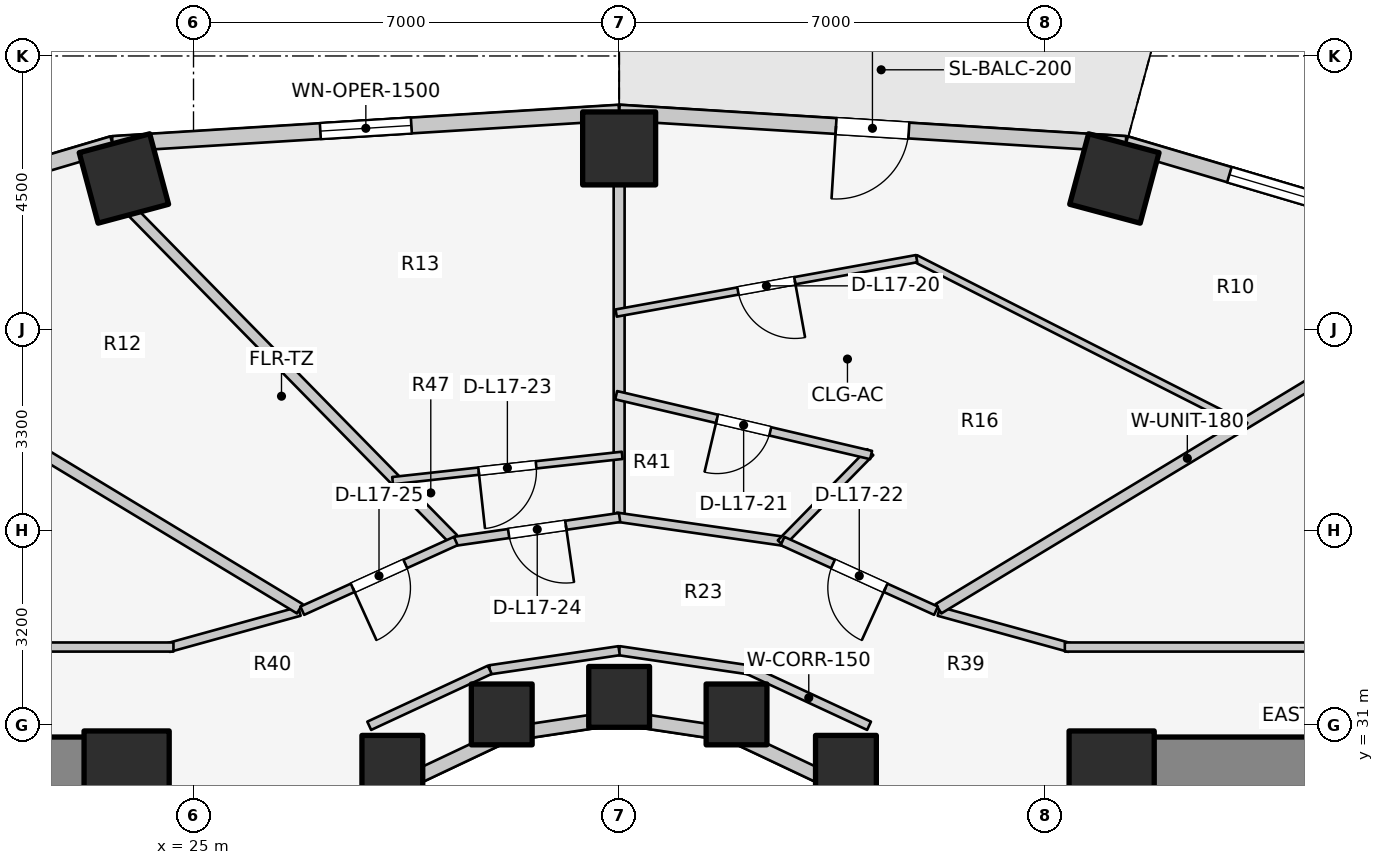
"""IFC4 building model, lengths in metres.
Left out: names, types, materials, properties, quantities, classifications, styles, units other than length and angle.
Written with IfcOpenShell. Run it as: python <this file> out.ifc"""

import sys

from ifc_helpers import new_model, si_unit, direction, frame, frame_2d, origin, origin_2d, place, context, subcontext, project, spatial, rectangle, extrude, element, fill, save


model = new_model("IFC4")
c1 = context("Model", 3, precision=1e-05, world=origin(), true_north=direction((0.0, 1.0)))
c2 = subcontext(c1, "Body", "Model", "MODEL_VIEW")
j1 = project(units=[si_unit("LENGTHUNIT", "METRE"), si_unit("PLANEANGLEUNIT", "RADIAN")], contexts=[c1])
p1 = place(None, origin())
s1 = spatial("IfcSite", under=j1, at=p1, CompositionType="ELEMENT")
p2 = place(p1, origin())
s2 = spatial("IfcBuilding", under=s1, at=p2, CompositionType="ELEMENT")
p3 = place(p2, frame((0.0, 0.0, 58.6)))
s3 = spatial("IfcBuildingStorey", under=s2, at=p3, CompositionType="ELEMENT", Elevation=58.6)
for number, where, z_axis, x_axis in (
    (1, (19.65, 30.35, 0.0), (0.0, 0.0, 1.0), (1.0, 0.0, 0.0)),
    (2, (39.85, 30.35, 0.0), (0.0, 0.0, 1.0), (1.0, 0.0, 0.0)),
):
    element("IfcWall", number, at=place(p3, frame(where, z_axis=z_axis, x_axis=x_axis)), inside=s3, PredefinedType="SHEAR", context=c2, shape_type="SweptSolid", body=[
        extrude(rectangle(XDim=4.5, YDim=0.9, at=frame_2d((2.25, 0.0))), origin(), (0.0, 0.0, 1.0), 3.1),
    ])
for number, where, z_axis, x_axis in (
    (3, (23.9, 30.2, 0.0), (0.0, 0.0, 1.0), (1.0, 0.0, 0.0)),
    (4, (40.1, 30.2, 0.0), (0.0, 0.0, 1.0), (1.0, 0.0, 0.0)),
):
    element("IfcColumn", number, at=place(p3, frame(where, z_axis=z_axis, x_axis=x_axis)), inside=s3, PredefinedType="COLUMN", context=c2, shape_type="SweptSolid", body=[
        extrude(rectangle(XDim=1.4, YDim=1.4, at=origin_2d()), origin(), (0.0, 0.0, 1.0), 3.1),
    ])
for number, where, z_axis, x_axis in (
    (5, (35.73, 30.327, 0.0), (0.0, 0.0, 1.0), (1.0, 0.0, 0.0)),
    (6, (33.931, 31.172, 0.0), (0.0, 0.0, 1.0), (1.0, 0.0, 0.0)),
):
    element("IfcColumn", number, at=place(p3, frame(where, z_axis=z_axis, x_axis=x_axis)), inside=s3, PredefinedType="COLUMN", context=c2, shape_type="SweptSolid", body=[
        extrude(rectangle(XDim=1.0, YDim=1.0, at=origin_2d()), origin(), (0.0, 0.0, 1.0), 3.1),
    ])
p4 = place(p3, frame((40.145, 39.986, 0.0), z_axis=(0.0, 0.0, 1.0), x_axis=(0.258819045103, 0.965925826289, 0.0)))
e7 = element("IfcColumn", 7, at=p4, inside=s3, PredefinedType="COLUMN", context=c2, shape_type="SweptSolid", body=[
    extrude(rectangle(XDim=1.2, YDim=1.2, at=origin_2d()), origin(), (0.0, 0.0, 1.0), 3.1),
])
p5 = place(p3, frame((32.0, 31.46, 0.0), z_axis=(0.0, 0.0, 1.0), x_axis=(1.0, 0.0, 0.0)))
e8 = element("IfcColumn", 8, at=p5, inside=s3, PredefinedType="COLUMN", context=c2, shape_type="SweptSolid", body=[
    extrude(rectangle(XDim=1.0, YDim=1.0, at=origin_2d()), origin(), (0.0, 0.0, 1.0), 3.1),
])
p6 = place(p3, frame((32.0, 40.48, 0.0), z_axis=(0.0, 0.0, 1.0), x_axis=(0.0, 1.0, 0.0)))
e9 = element("IfcColumn", 9, at=p6, inside=s3, PredefinedType="COLUMN", context=c2, shape_type="SweptSolid", body=[
    extrude(rectangle(XDim=1.2, YDim=1.2, at=origin_2d()), origin(), (0.0, 0.0, 1.0), 3.1),
])
p7 = place(p3, frame((30.069, 31.172, 0.0), z_axis=(0.0, 0.0, 1.0), x_axis=(1.0, 0.0, 0.0)))
e10 = element("IfcColumn", 10, at=p7, inside=s3, PredefinedType="COLUMN", context=c2, shape_type="SweptSolid", body=[
    extrude(rectangle(XDim=1.0, YDim=1.0, at=origin_2d()), origin(), (0.0, 0.0, 1.0), 3.1),
])
p8 = place(p3, frame((23.855, 39.986, 0.0), z_axis=(0.0, 0.0, 1.0), x_axis=(-0.258819045103, 0.965925826289, 0.0)))
e11 = element("IfcColumn", 11, at=p8, inside=s3, PredefinedType="COLUMN", context=c2, shape_type="SweptSolid", body=[
    extrude(rectangle(XDim=1.2, YDim=1.2, at=origin_2d()), origin(), (0.0, 0.0, 1.0), 3.1),
])
p9 = place(p3, frame((28.27, 30.327, 0.0), z_axis=(0.0, 0.0, 1.0), x_axis=(1.0, 0.0, 0.0)))
e12 = element("IfcColumn", 12, at=p9, inside=s3, PredefinedType="COLUMN", context=c2, shape_type="SweptSolid", body=[
    extrude(rectangle(XDim=1.0, YDim=1.0, at=origin_2d()), origin(), (0.0, 0.0, 1.0), 3.1),
])
p10 = place(p3, frame((37.035, 28.742, 0.0), z_axis=(0.0, 0.0, 1.0), x_axis=(-0.752576694707, 0.658504607869, 0.0)))
e13 = element("IfcWall", 13, at=p10, inside=s3, PredefinedType="STANDARD", context=c2, shape_type="SweptSolid", body=[
    extrude(rectangle(XDim=1.959, YDim=0.23, at=frame_2d((0.98, 0.0))), origin(), (0.0, 0.0, 1.0), 2.16),
])
p11 = place(p3, frame((35.56, 30.032, 0.0), z_axis=(0.0, 0.0, 1.0), x_axis=(-0.904179699603, 0.427152280606, 0.0)))
e14 = element("IfcWall", 14, at=p11, inside=s3, PredefinedType="STANDARD", context=c2, shape_type="SweptSolid", body=[
    extrude(rectangle(XDim=1.899, YDim=0.23, at=frame_2d((0.95, 0.0))), origin(), (0.0, 0.0, 1.0), 2.16),
])
for number, where, z_axis, x_axis in (
    (15, (33.843, 30.843, 0.0), (0.0, 0.0, 1.0), (-0.989, 0.149, 0.0)),
    (16, (32.0, 31.12, 0.0), (0.0, 0.0, 1.0), (-0.989, -0.149, 0.0)),
):
    element("IfcWall", number, at=place(p3, frame(where, z_axis=z_axis, x_axis=x_axis)), inside=s3, PredefinedType="STANDARD", context=c2, shape_type="SweptSolid", body=[
        extrude(rectangle(XDim=1.864, YDim=0.23, at=frame_2d((0.932, 0.0))), origin(), (0.0, 0.0, 1.0), 2.16),
    ])
p12 = place(p3, frame((30.157, 30.843, 0.0), z_axis=(0.0, 0.0, 1.0), x_axis=(-0.904179699603, -0.427152280606, 0.0)))
e17 = element("IfcWall", 17, at=p12, inside=s3, PredefinedType="STANDARD", context=c2, shape_type="SweptSolid", body=[
    extrude(rectangle(XDim=1.899, YDim=0.23, at=frame_2d((0.95, 0.0))), origin(), (0.0, 0.0, 1.0), 2.16),
])
p13 = place(p3, frame((28.44, 30.032, 0.0), z_axis=(0.0, 0.0, 1.0), x_axis=(-0.752576694707, -0.658504607869, 0.0)))
e18 = element("IfcWall", 18, at=p13, inside=s3, PredefinedType="STANDARD", context=c2, shape_type="SweptSolid", body=[
    extrude(rectangle(XDim=1.959, YDim=0.23, at=frame_2d((0.98, 0.0))), origin(), (0.0, 0.0, 1.0), 2.16),
])
p14 = place(p3, frame((46.042, 38.862, 0.0), z_axis=(0.0, 0.0, 1.0), x_axis=(-0.958843593522, 0.283934786811, 0.0)))
e19 = element("IfcWall", 19, at=p14, inside=s3, PredefinedType="STANDARD", context=c2, shape_type="SweptSolid", body=[
    extrude(rectangle(XDim=5.955, YDim=0.26, at=frame_2d((2.978, 0.0))), origin(), (0.0, 0.0, 1.0), 2.85),
])
p15 = place(p14, frame((1.778, 0.0, 0.75)))
e20 = element("IfcOpeningElement", 20, at=p15, cuts=e19, PredefinedType="OPENING", context=c2, shape_type="SweptSolid", body=[
    extrude(rectangle(XDim=2.4, YDim=1.7, at=frame_2d((1.2, 0.85))), frame((0.0, 0.14, 0.0), z_axis=(0.0, -1.0, 0.0), x_axis=(1.0, 0.0, 0.0)), (0.0, 0.0, 1.0), 0.28),
])
p16 = place(p3, frame((40.332, 40.553, 0.0), z_axis=(0.0, 0.0, 1.0), x_axis=(-0.998090514779, 0.061768311519, 0.0)))
e21 = element("IfcWall", 21, at=p16, inside=s3, PredefinedType="STANDARD", context=c2, shape_type="SweptSolid", body=[
    extrude(rectangle(XDim=8.348, YDim=0.26, at=frame_2d((4.174, 0.0))), origin(), (0.0, 0.0, 1.0), 2.88),
])
p17 = place(p16, frame((3.574, 0.0, 0.0)))
e22 = element("IfcOpeningElement", 22, at=p17, cuts=e21, PredefinedType="OPENING", context=c2, shape_type="SweptSolid", body=[
    extrude(rectangle(XDim=1.2, YDim=2.2, at=frame_2d((0.6, 1.1))), frame((0.0, 0.14, 0.0), z_axis=(0.0, -1.0, 0.0), x_axis=(1.0, 0.0, 0.0)), (0.0, 0.0, 1.0), 0.28),
])
p18 = place(p3, frame((32.0, 41.069, 0.0), z_axis=(0.0, 0.0, 1.0), x_axis=(-0.998090514779, -0.061768311519, 0.0)))
e23 = element("IfcWall", 23, at=p18, inside=s3, PredefinedType="STANDARD", context=c2, shape_type="SweptSolid", body=[
    extrude(rectangle(XDim=8.348, YDim=0.26, at=frame_2d((4.174, 0.0))), origin(), (0.0, 0.0, 1.0), 2.85),
])
p19 = place(p18, frame((3.424, 0.0, 0.75)))
e24 = element("IfcOpeningElement", 24, at=p19, cuts=e23, PredefinedType="OPENING", context=c2, shape_type="SweptSolid", body=[
    extrude(rectangle(XDim=1.5, YDim=1.6, at=frame_2d((0.75, 0.8))), frame((0.0, 0.14, 0.0), z_axis=(0.0, -1.0, 0.0), x_axis=(1.0, 0.0, 0.0)), (0.0, 0.0, 1.0), 0.28),
])
p20 = place(p3, frame((23.668, 40.553, 0.0), z_axis=(0.0, 0.0, 1.0), x_axis=(-0.958843593522, -0.283934786811, 0.0)))
e25 = element("IfcWall", 25, at=p20, inside=s3, PredefinedType="STANDARD", context=c2, shape_type="SweptSolid", body=[
    extrude(rectangle(XDim=5.955, YDim=0.26, at=frame_2d((2.978, 0.0))), origin(), (0.0, 0.0, 1.0), 2.85),
])
p21 = place(p20, frame((1.778, 0.0, 0.75)))
e26 = element("IfcOpeningElement", 26, at=p21, cuts=e25, PredefinedType="OPENING", context=c2, shape_type="SweptSolid", body=[
    extrude(rectangle(XDim=2.4, YDim=1.7, at=frame_2d((1.2, 0.85))), frame((0.0, 0.14, 0.0), z_axis=(0.0, -1.0, 0.0), x_axis=(1.0, 0.0, 0.0)), (0.0, 0.0, 1.0), 0.28),
])
p22 = place(p3, frame((36.11, 30.985, 0.0), z_axis=(0.0, 0.0, 1.0), x_axis=(-0.906943449489, 0.421252393975, 0.0)))
e27 = element("IfcWall", 27, at=p22, inside=s3, PredefinedType="PARTITIONING", context=c2, shape_type="SweptSolid", body=[
    extrude(rectangle(XDim=2.186, YDim=0.15, at=frame_2d((1.093, 0.0))), origin(), (0.0, 0.0, 1.0), 2.237),
])
for number, where, z_axis, x_axis in (
    (28, (34.127, 31.906, 0.0), (0.0, 0.0, 1.0), (-0.989, 0.146, 0.0)),
    (29, (32.0, 32.22, 0.0), (0.0, 0.0, 1.0), (-0.989, -0.146, 0.0)),
):
    element("IfcWall", number, at=place(p3, frame(where, z_axis=z_axis, x_axis=x_axis)), inside=s3, PredefinedType="PARTITIONING", context=c2, shape_type="SweptSolid", body=[
        extrude(rectangle(XDim=2.151, YDim=0.15, at=frame_2d((1.075, 0.0))), origin(), (0.0, 0.0, 1.0), 2.237),
    ])
p23 = place(p3, frame((29.873, 31.906, 0.0), z_axis=(0.0, 0.0, 1.0), x_axis=(-0.906943449489, -0.421252393975, 0.0)))
e30 = element("IfcWall", 30, at=p23, inside=s3, PredefinedType="PARTITIONING", context=c2, shape_type="SweptSolid", body=[
    extrude(rectangle(XDim=2.186, YDim=0.15, at=frame_2d((1.093, 0.0))), origin(), (0.0, 0.0, 1.0), 2.237),
])
p24 = place(p3, frame((37.258, 32.867, 0.0), z_axis=(0.0, 0.0, 1.0), x_axis=(0.963833843713, -0.266503886865, 0.0)))
e31 = element("IfcWall", 31, at=p24, inside=s3, PredefinedType="PARTITIONING", context=c2, shape_type="SweptSolid", body=[
    extrude(rectangle(XDim=2.232, YDim=0.15, at=frame_2d((1.116, 0.0))), origin(), (0.0, 0.0, 1.0), 2.237),
])
p25 = place(p3, frame((39.33, 32.28, 0.0), z_axis=(0.0, 0.0, 1.0), x_axis=(1.0, 0.0, 0.0)))
e32 = element("IfcWall", 32, at=p25, inside=s3, PredefinedType="PARTITIONING", context=c2, shape_type="SweptSolid", body=[
    extrude(rectangle(XDim=7.52, YDim=0.15, at=frame_2d((3.76, 0.0))), origin(), (0.0, 0.0, 1.0), 2.237),
])
p26 = place(p25, frame((5.22, 0.0, 0.0)))
e33 = element("IfcOpeningElement", 33, at=p26, cuts=e32, PredefinedType="OPENING", context=c2, shape_type="SweptSolid", body=[
    extrude(rectangle(XDim=0.9, YDim=2.1, at=frame_2d((0.45, 1.05))), frame((0.0, 0.085, 0.0), z_axis=(0.0, -1.0, 0.0), x_axis=(1.0, 0.0, 0.0)), (0.0, 0.0, 1.0), 0.17),
])
p27 = place(p3, frame((26.742, 32.867, 0.0), z_axis=(0.0, 0.0, 1.0), x_axis=(-0.963833843713, -0.266503886865, 0.0)))
e34 = element("IfcWall", 34, at=p27, inside=s3, PredefinedType="PARTITIONING", context=c2, shape_type="SweptSolid", body=[
    extrude(rectangle(XDim=2.232, YDim=0.15, at=frame_2d((1.116, 0.0))), origin(), (0.0, 0.0, 1.0), 2.237),
])
p28 = place(p3, frame((17.15, 32.28, 0.0), z_axis=(0.0, 0.0, 1.0), x_axis=(1.0, 0.0, 0.0)))
e35 = element("IfcWall", 35, at=p28, inside=s3, PredefinedType="PARTITIONING", context=c2, shape_type="SweptSolid", body=[
    extrude(rectangle(XDim=7.52, YDim=0.15, at=frame_2d((3.76, 0.0))), origin(), (0.0, 0.0, 1.0), 2.237),
])
p29 = place(p28, frame((1.3, 0.0, 0.0)))
e36 = element("IfcOpeningElement", 36, at=p29, cuts=e35, PredefinedType="OPENING", context=c2, shape_type="SweptSolid", body=[
    extrude(rectangle(XDim=0.9, YDim=2.1, at=frame_2d((0.45, 1.05))), frame((0.0, 0.085, 0.0), z_axis=(0.0, -1.0, 0.0), x_axis=(1.0, 0.0, 0.0)), (0.0, 0.0, 1.0), 0.17),
])
p30 = place(p3, frame((37.252, 32.91, 0.0), z_axis=(0.0, 0.0, 1.0), x_axis=(0.855817136021, 0.517278483694, 0.0)))
e37 = element("IfcWall", 37, at=p30, inside=s3, PredefinedType="PARTITIONING", context=c2, shape_type="SweptSolid", body=[
    extrude(rectangle(XDim=9.564, YDim=0.18, at=frame_2d((4.782, 0.0))), origin(), (0.0, 0.0, 1.0), 2.237),
])
p31 = place(p3, frame((32.0, 34.465, 0.0), z_axis=(0.0, 0.0, 1.0), x_axis=(0.0, 1.0, 0.0)))
e38 = element("IfcWall", 38, at=p31, inside=s3, PredefinedType="PARTITIONING", context=c2, shape_type="SweptSolid", body=[
    extrude(rectangle(XDim=5.435, YDim=0.18, at=frame_2d((2.717, 0.0))), origin(), (0.0, 0.0, 1.0), 2.237),
])
p32 = place(p3, frame((29.267, 34.061, 0.0), z_axis=(0.0, 0.0, 1.0), x_axis=(-0.700234780085, 0.713912636644, 0.0)))
e39 = element("IfcWall", 39, at=p32, inside=s3, PredefinedType="PARTITIONING", context=c2, shape_type="SweptSolid", body=[
    extrude(rectangle(XDim=7.515, YDim=0.18, at=frame_2d((3.757, 0.0))), origin(), (0.0, 0.0, 1.0), 2.237),
])
p33 = place(p3, frame((26.748, 32.91, 0.0), z_axis=(0.0, 0.0, 1.0), x_axis=(-0.855817136021, 0.517278483694, 0.0)))
e40 = element("IfcWall", 40, at=p33, inside=s3, PredefinedType="PARTITIONING", context=c2, shape_type="SweptSolid", body=[
    extrude(rectangle(XDim=9.564, YDim=0.18, at=frame_2d((4.782, 0.0))), origin(), (0.0, 0.0, 1.0), 2.237),
])
p34 = place(p3, frame((42.305, 35.914, 0.0), z_axis=(0.0, 0.0, 1.0), x_axis=(-0.891749407737, 0.452529550195, 0.0)))
e41 = element("IfcWall", 41, at=p34, inside=s3, PredefinedType="MOVABLE", context=c2, shape_type="SweptSolid", body=[
    extrude(rectangle(XDim=6.09, YDim=0.12, at=frame_2d((3.045, 0.0))), origin(), (0.0, 0.0, 1.0), 2.237),
])
p35 = place(p3, frame((36.893, 38.667, 0.0), z_axis=(0.0, 0.0, 1.0), x_axis=(-0.983992567634, -0.178209502665, 0.0)))
e42 = element("IfcWall", 42, at=p35, inside=s3, PredefinedType="MOVABLE", context=c2, shape_type="SweptSolid", body=[
    extrude(rectangle(XDim=5.022, YDim=0.12, at=frame_2d((2.511, 0.0))), origin(), (0.0, 0.0, 1.0), 2.237),
])
p36 = place(p35, frame((2.036, 0.0, 0.0)))
e43 = element("IfcOpeningElement", 43, at=p36, cuts=e42, PredefinedType="OPENING", context=c2, shape_type="SweptSolid", body=[
    extrude(rectangle(XDim=0.95, YDim=2.1, at=frame_2d((0.475, 1.05))), frame((0.0, 0.07, 0.0), z_axis=(0.0, -1.0, 0.0), x_axis=(1.0, 0.0, 0.0)), (0.0, 0.0, 1.0), 0.14),
])
p37 = place(p3, frame((34.744, 34.014, 0.0), z_axis=(0.0, 0.0, 1.0), x_axis=(-0.989761784218, 0.142729150844, 0.0)))
e44 = element("IfcWall", 44, at=p37, inside=s3, PredefinedType="PARTITIONING", context=c2, shape_type="SweptSolid", body=[
    extrude(rectangle(XDim=2.822, YDim=0.15, at=frame_2d((1.411, 0.0))), origin(), (0.0, 0.0, 1.0), 2.237),
])
p38 = place(p3, frame((34.659, 33.986, 0.0), z_axis=(0.0, 0.0, 1.0), x_axis=(0.700331728855, 0.713817532398, 0.0)))
e45 = element("IfcWall", 45, at=p38, inside=s3, PredefinedType="PLUMBINGWALL", context=c2, shape_type="SweptSolid", body=[
    extrude(rectangle(XDim=2.1, YDim=0.14, at=frame_2d((1.05, 0.0))), origin(), (0.0, 0.0, 1.0), 2.385),
])
p39 = place(p3, frame((36.144, 35.438, 0.0), z_axis=(0.0, 0.0, 1.0), x_axis=(-0.973546394015, 0.228489427982, 0.0)))
e46 = element("IfcWall", 46, at=p39, inside=s3, PredefinedType="PLUMBINGWALL", context=c2, shape_type="SweptSolid", body=[
    extrude(rectangle(XDim=4.306, YDim=0.14, at=frame_2d((2.153, 0.0))), origin(), (0.0, 0.0, 1.0), 2.237),
])
p40 = place(p39, frame((1.703, 0.0, 0.0)))
e47 = element("IfcOpeningElement", 47, at=p40, cuts=e46, PredefinedType="OPENING", context=c2, shape_type="SweptSolid", body=[
    extrude(rectangle(XDim=0.9, YDim=2.1, at=frame_2d((0.45, 1.05))), frame((0.0, 0.08, 0.0), z_axis=(0.0, -1.0, 0.0), x_axis=(1.0, 0.0, 0.0)), (0.0, 0.0, 1.0), 0.16),
])
p41 = place(p3, frame((37.211, 32.877, 0.0), z_axis=(0.0, 0.0, 1.0), x_axis=(-0.910568469686, 0.41335827319, 0.0)))
e48 = element("IfcWall", 48, at=p41, inside=s3, PredefinedType="PARTITIONING", context=c2, shape_type="SweptSolid", body=[
    extrude(rectangle(XDim=2.772, YDim=0.15, at=frame_2d((1.386, 0.0))), origin(), (0.0, 0.0, 1.0), 2.237),
])
p42 = place(p41, frame((0.911, 0.0, 0.0)))
e49 = element("IfcOpeningElement", 49, at=p42, cuts=e48, PredefinedType="OPENING", context=c2, shape_type="SweptSolid", body=[
    extrude(rectangle(XDim=0.95, YDim=2.1, at=frame_2d((0.475, 1.05))), frame((0.0, 0.085, 0.0), z_axis=(0.0, -1.0, 0.0), x_axis=(1.0, 0.0, 0.0)), (0.0, 0.0, 1.0), 0.17),
])
p43 = place(p3, frame((32.05, 35.432, 0.0), z_axis=(0.0, 0.0, 1.0), x_axis=(-0.993997647441, -0.109401448263, 0.0)))
e50 = element("IfcWall", 50, at=p43, inside=s3, PredefinedType="MOVABLE", context=c2, shape_type="SweptSolid", body=[
    extrude(rectangle(XDim=3.798, YDim=0.12, at=frame_2d((1.899, 0.0))), origin(), (0.0, 0.0, 1.0), 2.237),
])
p44 = place(p43, frame((1.424, 0.0, 0.0)))
e51 = element("IfcOpeningElement", 51, at=p44, cuts=e50, PredefinedType="OPENING", context=c2, shape_type="SweptSolid", body=[
    extrude(rectangle(XDim=0.95, YDim=2.1, at=frame_2d((0.475, 1.05))), frame((0.0, 0.07, 0.0), z_axis=(0.0, -1.0, 0.0), x_axis=(1.0, 0.0, 0.0)), (0.0, 0.0, 1.0), 0.14),
])
p45 = place(p3, frame((32.007, 34.41, 0.0), z_axis=(0.0, 0.0, 1.0), x_axis=(-0.989748682384, -0.142819976611, 0.0)))
e52 = element("IfcWall", 52, at=p45, inside=s3, PredefinedType="PARTITIONING", context=c2, shape_type="SweptSolid", body=[
    extrude(rectangle(XDim=2.737, YDim=0.15, at=frame_2d((1.368, 0.0))), origin(), (0.0, 0.0, 1.0), 2.237),
])
p46 = place(p45, frame((0.893, 0.0, 0.0)))
e53 = element("IfcOpeningElement", 53, at=p46, cuts=e52, PredefinedType="OPENING", context=c2, shape_type="SweptSolid", body=[
    extrude(rectangle(XDim=0.95, YDim=2.1, at=frame_2d((0.475, 1.05))), frame((0.0, 0.085, 0.0), z_axis=(0.0, -1.0, 0.0), x_axis=(1.0, 0.0, 0.0)), (0.0, 0.0, 1.0), 0.17),
])
p47 = place(p3, frame((29.313, 34.023, 0.0), z_axis=(0.0, 0.0, 1.0), x_axis=(-0.910568469686, -0.41335827319, 0.0)))
e54 = element("IfcWall", 54, at=p47, inside=s3, PredefinedType="PARTITIONING", context=c2, shape_type="SweptSolid", body=[
    extrude(rectangle(XDim=2.772, YDim=0.15, at=frame_2d((1.386, 0.0))), origin(), (0.0, 0.0, 1.0), 2.237),
])
p48 = place(p47, frame((0.911, 0.0, 0.0)))
e55 = element("IfcOpeningElement", 55, at=p48, cuts=e54, PredefinedType="OPENING", context=c2, shape_type="SweptSolid", body=[
    extrude(rectangle(XDim=0.95, YDim=2.1, at=frame_2d((0.475, 1.05))), frame((0.0, 0.085, 0.0), z_axis=(0.0, -1.0, 0.0), x_axis=(1.0, 0.0, 0.0)), (0.0, 0.0, 1.0), 0.17),
])
p49 = place(p15, origin())
e56 = element("IfcWindow", 56, at=p49, inside=s3, PartitioningType="SINGLE_PANEL", PredefinedType="WINDOW", context=c2, shape_type="SweptSolid", body=[
    extrude(rectangle(XDim=2.4, YDim=1.7, at=frame_2d((1.2, 0.85))), frame((0.0, 0.03, 0.0), z_axis=(0.0, -1.0, 0.0), x_axis=(1.0, 0.0, 0.0)), (0.0, 0.0, 1.0), 0.06),
])
fill(e20, e56)
p50 = place(p17, origin())
e57 = element("IfcDoor", 57, at=p50, inside=s3, OperationType="SINGLE_SWING_RIGHT", PredefinedType="DOOR", context=c2, shape_type="SweptSolid", body=[
    extrude(rectangle(XDim=1.2, YDim=2.2, at=frame_2d((0.6, 1.1))), frame((0.0, 0.025, 0.0), z_axis=(0.0, -1.0, 0.0), x_axis=(1.0, 0.0, 0.0)), (0.0, 0.0, 1.0), 0.05),
])
fill(e22, e57)
p51 = place(p19, origin())
e58 = element("IfcWindow", 58, at=p51, inside=s3, PartitioningType="SINGLE_PANEL", PredefinedType="WINDOW", context=c2, shape_type="SweptSolid", body=[
    extrude(rectangle(XDim=1.5, YDim=1.6, at=frame_2d((0.75, 0.8))), frame((0.0, 0.03, 0.0), z_axis=(0.0, -1.0, 0.0), x_axis=(1.0, 0.0, 0.0)), (0.0, 0.0, 1.0), 0.06),
])
fill(e24, e58)
p52 = place(p36, origin())
e59 = element("IfcDoor", 59, at=p52, inside=s3, OperationType="SINGLE_SWING_LEFT", PredefinedType="DOOR", context=c2, shape_type="SweptSolid", body=[
    extrude(rectangle(XDim=0.95, YDim=2.1, at=frame_2d((0.475, 1.05))), frame((0.0, 0.025, 0.0), z_axis=(0.0, -1.0, 0.0), x_axis=(1.0, 0.0, 0.0)), (0.0, 0.0, 1.0), 0.05),
])
fill(e43, e59)
p53 = place(p40, origin())
e60 = element("IfcDoor", 60, at=p53, inside=s3, OperationType="SINGLE_SWING_RIGHT", PredefinedType="DOOR", context=c2, shape_type="SweptSolid", body=[
    extrude(rectangle(XDim=0.9, YDim=2.1, at=frame_2d((0.45, 1.05))), frame((0.0, 0.025, 0.0), z_axis=(0.0, -1.0, 0.0), x_axis=(1.0, 0.0, 0.0)), (0.0, 0.0, 1.0), 0.05),
])
fill(e47, e60)
p54 = place(p42, origin())
e61 = element("IfcDoor", 61, at=p54, inside=s3, OperationType="SINGLE_SWING_LEFT", PredefinedType="DOOR", context=c2, shape_type="SweptSolid", body=[
    extrude(rectangle(XDim=0.95, YDim=2.1, at=frame_2d((0.475, 1.05))), frame((0.0, 0.025, 0.0), z_axis=(0.0, -1.0, 0.0), x_axis=(1.0, 0.0, 0.0)), (0.0, 0.0, 1.0), 0.05),
])
fill(e49, e61)
p55 = place(p44, origin())
e62 = element("IfcDoor", 62, at=p55, inside=s3, OperationType="SINGLE_SWING_RIGHT", PredefinedType="DOOR", context=c2, shape_type="SweptSolid", body=[
    extrude(rectangle(XDim=0.95, YDim=2.1, at=frame_2d((0.475, 1.05))), frame((0.0, 0.025, 0.0), z_axis=(0.0, -1.0, 0.0), x_axis=(1.0, 0.0, 0.0)), (0.0, 0.0, 1.0), 0.05),
])
fill(e51, e62)
p56 = place(p46, origin())
e63 = element("IfcDoor", 63, at=p56, inside=s3, OperationType="SINGLE_SWING_LEFT", PredefinedType="DOOR", context=c2, shape_type="SweptSolid", body=[
    extrude(rectangle(XDim=0.95, YDim=2.1, at=frame_2d((0.475, 1.05))), frame((0.0, 0.025, 0.0), z_axis=(0.0, -1.0, 0.0), x_axis=(1.0, 0.0, 0.0)), (0.0, 0.0, 1.0), 0.05),
])
fill(e53, e63)
p57 = place(p48, origin())
e64 = element("IfcDoor", 64, at=p57, inside=s3, OperationType="SINGLE_SWING_RIGHT", PredefinedType="DOOR", context=c2, shape_type="SweptSolid", body=[
    extrude(rectangle(XDim=0.95, YDim=2.1, at=frame_2d((0.475, 1.05))), frame((0.0, 0.025, 0.0), z_axis=(0.0, -1.0, 0.0), x_axis=(1.0, 0.0, 0.0)), (0.0, 0.0, 1.0), 0.05),
])
fill(e55, e64)
save(model, sys.argv[1])
